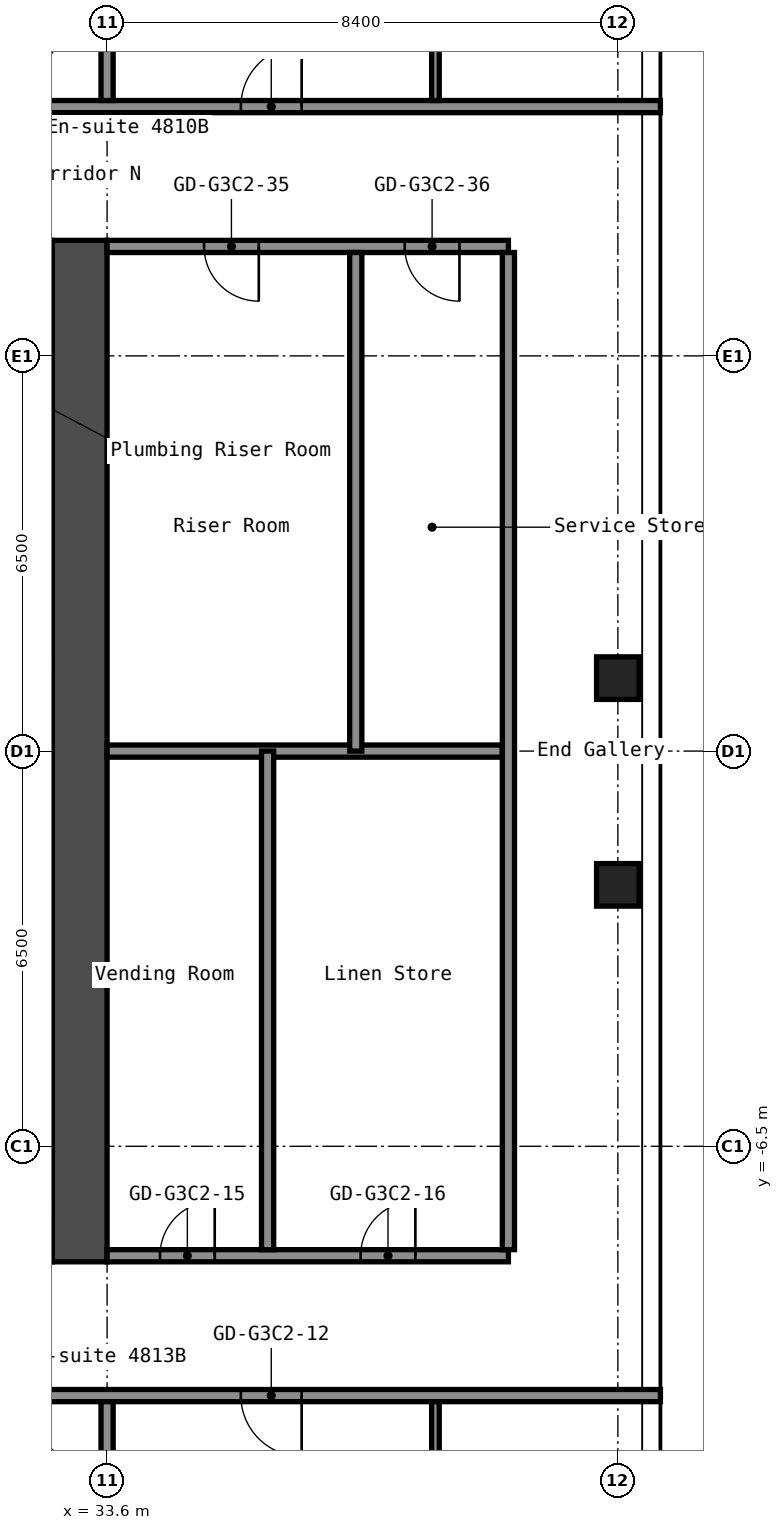
"""IFC4 building model, lengths in metres.
Left out: names, types, materials, properties, quantities, classifications, styles, units other than length and angle.
Written with IfcOpenShell. Run it as: python <this file> out.ifc"""

import sys

from ifc_helpers import new_model, si_unit, direction, frame, frame_2d, origin, origin_2d, place, context, subcontext, project, spatial, rectangle, hollow_rectangle, extrude, element, fill, save


model = new_model("IFC4")
c1 = context("Model", 3, precision=1e-05, world=origin(), true_north=direction((0.0, 1.0)))
c2 = subcontext(c1, "Body", "Model", "MODEL_VIEW")
j1 = project(units=[si_unit("LENGTHUNIT", "METRE"), si_unit("PLANEANGLEUNIT", "RADIAN")], contexts=[c1])
p1 = place(None, origin())
s1 = spatial("IfcSite", under=j1, at=p1, CompositionType="ELEMENT")
p2 = place(p1, origin())
s2 = spatial("IfcBuilding", under=s1, at=p2, CompositionType="ELEMENT")
p3 = place(p2, frame((0.0, 0.0, 169.4)))
s3 = spatial("IfcBuildingStorey", under=s2, at=p3, CompositionType="ELEMENT", Elevation=169.4)
for number, where, z_axis, x_axis in (
    (1, (42.0, -2.2, 0.0), (0.0, 0.0, 1.0), (1.0, 0.0, 0.0)),
    (2, (42.0, 1.2, 0.0), (0.0, 0.0, 1.0), (1.0, 0.0, 0.0)),
):
    element("IfcColumn", number, at=place(p3, frame(where, z_axis=z_axis, x_axis=x_axis)), inside=s3, PredefinedType="COLUMN", context=c2, shape_type="SweptSolid", body=[
        extrude(hollow_rectangle(XDim=0.7, YDim=0.7, WallThickness=0.028, at=origin_2d()), origin(), (0.0, 0.0, 1.0), 2.75),
    ])
p4 = place(p3, frame((33.15, -8.4, 0.0), z_axis=(0.0, 0.0, 1.0), x_axis=(0.0, 1.0, 0.0)))
e3 = element("IfcWall", 3, at=p4, inside=s3, PredefinedType="SHEAR", context=c2, shape_type="SweptSolid", body=[
    extrude(rectangle(XDim=16.8, YDim=0.9, at=frame_2d((8.4, 0.0))), origin(), (0.0, 0.0, 1.0), 2.75),
])
p5 = place(p3, frame((16.8, -10.6, 0.0), z_axis=(0.0, 0.0, 1.0), x_axis=(1.0, 0.0, 0.0)))
e4 = element("IfcWall", 4, at=p5, inside=s3, PredefinedType="PARTITIONING", context=c2, shape_type="SweptSolid", body=[
    extrude(rectangle(XDim=25.9, YDim=0.2, at=frame_2d((12.95, 0.0))), origin(), (0.0, 0.0, 1.0), 2.75),
])
p6 = place(p5, frame((5.4, 0.0, 0.0)))
e5 = element("IfcOpeningElement", 5, at=p6, cuts=e4, PredefinedType="OPENING", context=c2, shape_type="SweptSolid", body=[
    extrude(rectangle(XDim=1.0, YDim=2.1, at=frame_2d((0.5, 1.05))), frame((0.0, 0.11, 0.0), z_axis=(0.0, -1.0, 0.0), x_axis=(1.0, 0.0, 0.0)), (0.0, 0.0, 1.0), 0.22),
])
p7 = place(p5, frame((11.25, 0.0, 0.0)))
e6 = element("IfcOpeningElement", 6, at=p7, cuts=e4, PredefinedType="OPENING", context=c2, shape_type="SweptSolid", body=[
    extrude(rectangle(XDim=1.0, YDim=2.1, at=frame_2d((0.5, 1.05))), frame((0.0, 0.11, 0.0), z_axis=(0.0, -1.0, 0.0), x_axis=(1.0, 0.0, 0.0)), (0.0, 0.0, 1.0), 0.22),
])
p8 = place(p5, frame((12.95, 0.0, 0.0)))
e7 = element("IfcOpeningElement", 7, at=p8, cuts=e4, PredefinedType="OPENING", context=c2, shape_type="SweptSolid", body=[
    extrude(rectangle(XDim=1.0, YDim=2.1, at=frame_2d((0.5, 1.05))), frame((0.0, 0.11, 0.0), z_axis=(0.0, -1.0, 0.0), x_axis=(1.0, 0.0, 0.0)), (0.0, 0.0, 1.0), 0.22),
])
p9 = place(p5, frame((19.0, 0.0, 0.0)))
e8 = element("IfcOpeningElement", 8, at=p9, cuts=e4, PredefinedType="OPENING", context=c2, shape_type="SweptSolid", body=[
    extrude(rectangle(XDim=1.0, YDim=2.1, at=frame_2d((0.5, 1.05))), frame((0.0, 0.11, 0.0), z_axis=(0.0, -1.0, 0.0), x_axis=(1.0, 0.0, 0.0)), (0.0, 0.0, 1.0), 0.22),
])
p10 = place(p3, frame((33.6, -8.3, 0.0), z_axis=(0.0, 0.0, 1.0), x_axis=(1.0, 0.0, 0.0)))
e9 = element("IfcWall", 9, at=p10, inside=s3, PredefinedType="PARTITIONING", context=c2, shape_type="SweptSolid", body=[
    extrude(rectangle(XDim=6.6, YDim=0.2, at=frame_2d((3.3, 0.0))), origin(), (0.0, 0.0, 1.0), 2.75),
])
p11 = place(p10, frame((0.87, 0.0, 0.0)))
e10 = element("IfcOpeningElement", 10, at=p11, cuts=e9, PredefinedType="OPENING", context=c2, shape_type="SweptSolid", body=[
    extrude(rectangle(XDim=0.9, YDim=2.1, at=frame_2d((0.45, 1.05))), frame((0.0, 0.11, 0.0), z_axis=(0.0, -1.0, 0.0), x_axis=(1.0, 0.0, 0.0)), (0.0, 0.0, 1.0), 0.22),
])
p12 = place(p10, frame((4.17, 0.0, 0.0)))
e11 = element("IfcOpeningElement", 11, at=p12, cuts=e9, PredefinedType="OPENING", context=c2, shape_type="SweptSolid", body=[
    extrude(rectangle(XDim=0.9, YDim=2.1, at=frame_2d((0.45, 1.05))), frame((0.0, 0.11, 0.0), z_axis=(0.0, -1.0, 0.0), x_axis=(1.0, 0.0, 0.0)), (0.0, 0.0, 1.0), 0.22),
])
p13 = place(p3, frame((33.6, 0.0, 0.0), z_axis=(0.0, 0.0, 1.0), x_axis=(1.0, 0.0, 0.0)))
e12 = element("IfcWall", 12, at=p13, inside=s3, PredefinedType="PARTITIONING", context=c2, shape_type="SweptSolid", body=[
    extrude(rectangle(XDim=6.5, YDim=0.2, at=frame_2d((3.25, 0.0))), origin(), (0.0, 0.0, 1.0), 2.75),
])
p14 = place(p3, frame((33.6, 8.3, 0.0), z_axis=(0.0, 0.0, 1.0), x_axis=(1.0, 0.0, 0.0)))
e13 = element("IfcWall", 13, at=p14, inside=s3, PredefinedType="PARTITIONING", context=c2, shape_type="SweptSolid", body=[
    extrude(rectangle(XDim=6.6, YDim=0.2, at=frame_2d((3.3, 0.0))), origin(), (0.0, 0.0, 1.0), 2.75),
])
p15 = place(p14, frame((1.595, 0.0, 0.0)))
e14 = element("IfcOpeningElement", 14, at=p15, cuts=e13, PredefinedType="OPENING", context=c2, shape_type="SweptSolid", body=[
    extrude(rectangle(XDim=0.9, YDim=2.1, at=frame_2d((0.45, 1.05))), frame((0.0, 0.11, 0.0), z_axis=(0.0, -1.0, 0.0), x_axis=(1.0, 0.0, 0.0)), (0.0, 0.0, 1.0), 0.22),
])
p16 = place(p14, frame((4.895, 0.0, 0.0)))
e15 = element("IfcOpeningElement", 15, at=p16, cuts=e13, PredefinedType="OPENING", context=c2, shape_type="SweptSolid", body=[
    extrude(rectangle(XDim=0.9, YDim=2.1, at=frame_2d((0.45, 1.05))), frame((0.0, 0.11, 0.0), z_axis=(0.0, -1.0, 0.0), x_axis=(1.0, 0.0, 0.0)), (0.0, 0.0, 1.0), 0.22),
])
p17 = place(p3, frame((16.8, 10.6, 0.0), z_axis=(0.0, 0.0, 1.0), x_axis=(1.0, 0.0, 0.0)))
e16 = element("IfcWall", 16, at=p17, inside=s3, PredefinedType="PARTITIONING", context=c2, shape_type="SweptSolid", body=[
    extrude(rectangle(XDim=25.9, YDim=0.2, at=frame_2d((12.95, 0.0))), origin(), (0.0, 0.0, 1.0), 2.75),
])
p18 = place(p17, frame((5.4, 0.0, 0.0)))
e17 = element("IfcOpeningElement", 17, at=p18, cuts=e16, PredefinedType="OPENING", context=c2, shape_type="SweptSolid", body=[
    extrude(rectangle(XDim=1.0, YDim=2.1, at=frame_2d((0.5, 1.05))), frame((0.0, 0.11, 0.0), z_axis=(0.0, -1.0, 0.0), x_axis=(1.0, 0.0, 0.0)), (0.0, 0.0, 1.0), 0.22),
])
p19 = place(p17, frame((11.25, 0.0, 0.0)))
e18 = element("IfcOpeningElement", 18, at=p19, cuts=e16, PredefinedType="OPENING", context=c2, shape_type="SweptSolid", body=[
    extrude(rectangle(XDim=1.0, YDim=2.1, at=frame_2d((0.5, 1.05))), frame((0.0, 0.11, 0.0), z_axis=(0.0, -1.0, 0.0), x_axis=(1.0, 0.0, 0.0)), (0.0, 0.0, 1.0), 0.22),
])
p20 = place(p17, frame((12.95, 0.0, 0.0)))
e19 = element("IfcOpeningElement", 19, at=p20, cuts=e16, PredefinedType="OPENING", context=c2, shape_type="SweptSolid", body=[
    extrude(rectangle(XDim=1.0, YDim=2.1, at=frame_2d((0.5, 1.05))), frame((0.0, 0.11, 0.0), z_axis=(0.0, -1.0, 0.0), x_axis=(1.0, 0.0, 0.0)), (0.0, 0.0, 1.0), 0.22),
])
p21 = place(p17, frame((19.0, 0.0, 0.0)))
e20 = element("IfcOpeningElement", 20, at=p21, cuts=e16, PredefinedType="OPENING", context=c2, shape_type="SweptSolid", body=[
    extrude(rectangle(XDim=1.0, YDim=2.1, at=frame_2d((0.5, 1.05))), frame((0.0, 0.11, 0.0), z_axis=(0.0, -1.0, 0.0), x_axis=(1.0, 0.0, 0.0)), (0.0, 0.0, 1.0), 0.22),
])
p22 = place(p3, frame((33.6, -19.3, 0.0), z_axis=(0.0, 0.0, 1.0), x_axis=(0.0, 1.0, 0.0)))
e21 = element("IfcWall", 21, at=p22, inside=s3, PredefinedType="PARTITIONING", context=c2, shape_type="SweptSolid", body=[
    extrude(rectangle(XDim=8.6, YDim=0.2, at=frame_2d((4.3, 0.0))), origin(), (0.0, 0.0, 1.0), 2.75),
])
p23 = place(p3, frame((33.6, 10.7, 0.0), z_axis=(0.0, 0.0, 1.0), x_axis=(0.0, 1.0, 0.0)))
e22 = element("IfcWall", 22, at=p23, inside=s3, PredefinedType="PARTITIONING", context=c2, shape_type="SweptSolid", body=[
    extrude(rectangle(XDim=7.6, YDim=0.2, at=frame_2d((3.8, 0.0))), origin(), (0.0, 0.0, 1.0), 2.75),
])
for number, where, z_axis, x_axis in (
    (23, (36.24, -8.2, 0.0), (0.0, 0.0, 1.0), (0.0, 1.0, 0.0)),
    (24, (37.69, 0.0, 0.0), (0.0, 0.0, 1.0), (0.0, 1.0, 0.0)),
):
    element("IfcWall", number, at=place(p3, frame(where, z_axis=z_axis, x_axis=x_axis)), inside=s3, PredefinedType="PARTITIONING", context=c2, shape_type="SweptSolid", body=[
        extrude(rectangle(XDim=8.2, YDim=0.2, at=frame_2d((4.1, 0.0))), origin(), (0.0, 0.0, 1.0), 2.75),
    ])
for number, where, z_axis, x_axis in (
    (25, (39.0, -14.0, 0.0), (0.0, 0.0, 1.0), (0.0, 1.0, 0.0)),
    (26, (39.0, 10.7, 0.0), (0.0, 0.0, 1.0), (0.0, 1.0, 0.0)),
):
    element("IfcWall", number, at=place(p3, frame(where, z_axis=z_axis, x_axis=x_axis)), inside=s3, PredefinedType="PARTITIONING", context=c2, shape_type="SweptSolid", body=[
        extrude(rectangle(XDim=3.3, YDim=0.125, at=frame_2d((1.65, 0.0))), origin(), (0.0, 0.0, 1.0), 2.75),
    ])
p24 = place(p3, frame((40.2, -8.2, 0.0), z_axis=(0.0, 0.0, 1.0), x_axis=(0.0, 1.0, 0.0)))
e27 = element("IfcWall", 27, at=p24, inside=s3, PredefinedType="PARTITIONING", context=c2, shape_type="SweptSolid", body=[
    extrude(rectangle(XDim=16.4, YDim=0.2, at=frame_2d((8.2, 0.0))), origin(), (0.0, 0.0, 1.0), 2.75),
])
p25 = place(p9, origin())
e28 = element("IfcDoor", 28, at=p25, inside=s3, OperationType="SINGLE_SWING_RIGHT", PredefinedType="DOOR", context=c2, shape_type="SweptSolid", body=[
    extrude(rectangle(XDim=1.0, YDim=2.1, at=frame_2d((0.5, 1.05))), frame((0.0, 0.025, 0.0), z_axis=(0.0, -1.0, 0.0), x_axis=(1.0, 0.0, 0.0)), (0.0, 0.0, 1.0), 0.05),
])
fill(e8, e28)
p26 = place(p11, origin())
e29 = element("IfcDoor", 29, at=p26, inside=s3, OperationType="SINGLE_SWING_LEFT", PredefinedType="DOOR", context=c2, shape_type="SweptSolid", body=[
    extrude(rectangle(XDim=0.9, YDim=2.1, at=frame_2d((0.45, 1.05))), frame((0.0, 0.025, 0.0), z_axis=(0.0, -1.0, 0.0), x_axis=(1.0, 0.0, 0.0)), (0.0, 0.0, 1.0), 0.05),
])
fill(e10, e29)
p27 = place(p12, origin())
e30 = element("IfcDoor", 30, at=p27, inside=s3, OperationType="SINGLE_SWING_LEFT", PredefinedType="DOOR", context=c2, shape_type="SweptSolid", body=[
    extrude(rectangle(XDim=0.9, YDim=2.1, at=frame_2d((0.45, 1.05))), frame((0.0, 0.025, 0.0), z_axis=(0.0, -1.0, 0.0), x_axis=(1.0, 0.0, 0.0)), (0.0, 0.0, 1.0), 0.05),
])
fill(e11, e30)
p28 = place(p15, origin())
e31 = element("IfcDoor", 31, at=p28, inside=s3, OperationType="SINGLE_SWING_RIGHT", PredefinedType="DOOR", context=c2, shape_type="SweptSolid", body=[
    extrude(rectangle(XDim=0.9, YDim=2.1, at=frame_2d((0.45, 1.05))), frame((0.0, 0.025, 0.0), z_axis=(0.0, -1.0, 0.0), x_axis=(1.0, 0.0, 0.0)), (0.0, 0.0, 1.0), 0.05),
])
fill(e14, e31)
p29 = place(p16, origin())
e32 = element("IfcDoor", 32, at=p29, inside=s3, OperationType="SINGLE_SWING_RIGHT", PredefinedType="DOOR", context=c2, shape_type="SweptSolid", body=[
    extrude(rectangle(XDim=0.9, YDim=2.1, at=frame_2d((0.45, 1.05))), frame((0.0, 0.025, 0.0), z_axis=(0.0, -1.0, 0.0), x_axis=(1.0, 0.0, 0.0)), (0.0, 0.0, 1.0), 0.05),
])
fill(e15, e32)
p30 = place(p21, origin())
e33 = element("IfcDoor", 33, at=p30, inside=s3, OperationType="SINGLE_SWING_LEFT", PredefinedType="DOOR", context=c2, shape_type="SweptSolid", body=[
    extrude(rectangle(XDim=1.0, YDim=2.1, at=frame_2d((0.5, 1.05))), frame((0.0, 0.025, 0.0), z_axis=(0.0, -1.0, 0.0), x_axis=(1.0, 0.0, 0.0)), (0.0, 0.0, 1.0), 0.05),
])
fill(e20, e33)
save(model, sys.argv[1])
